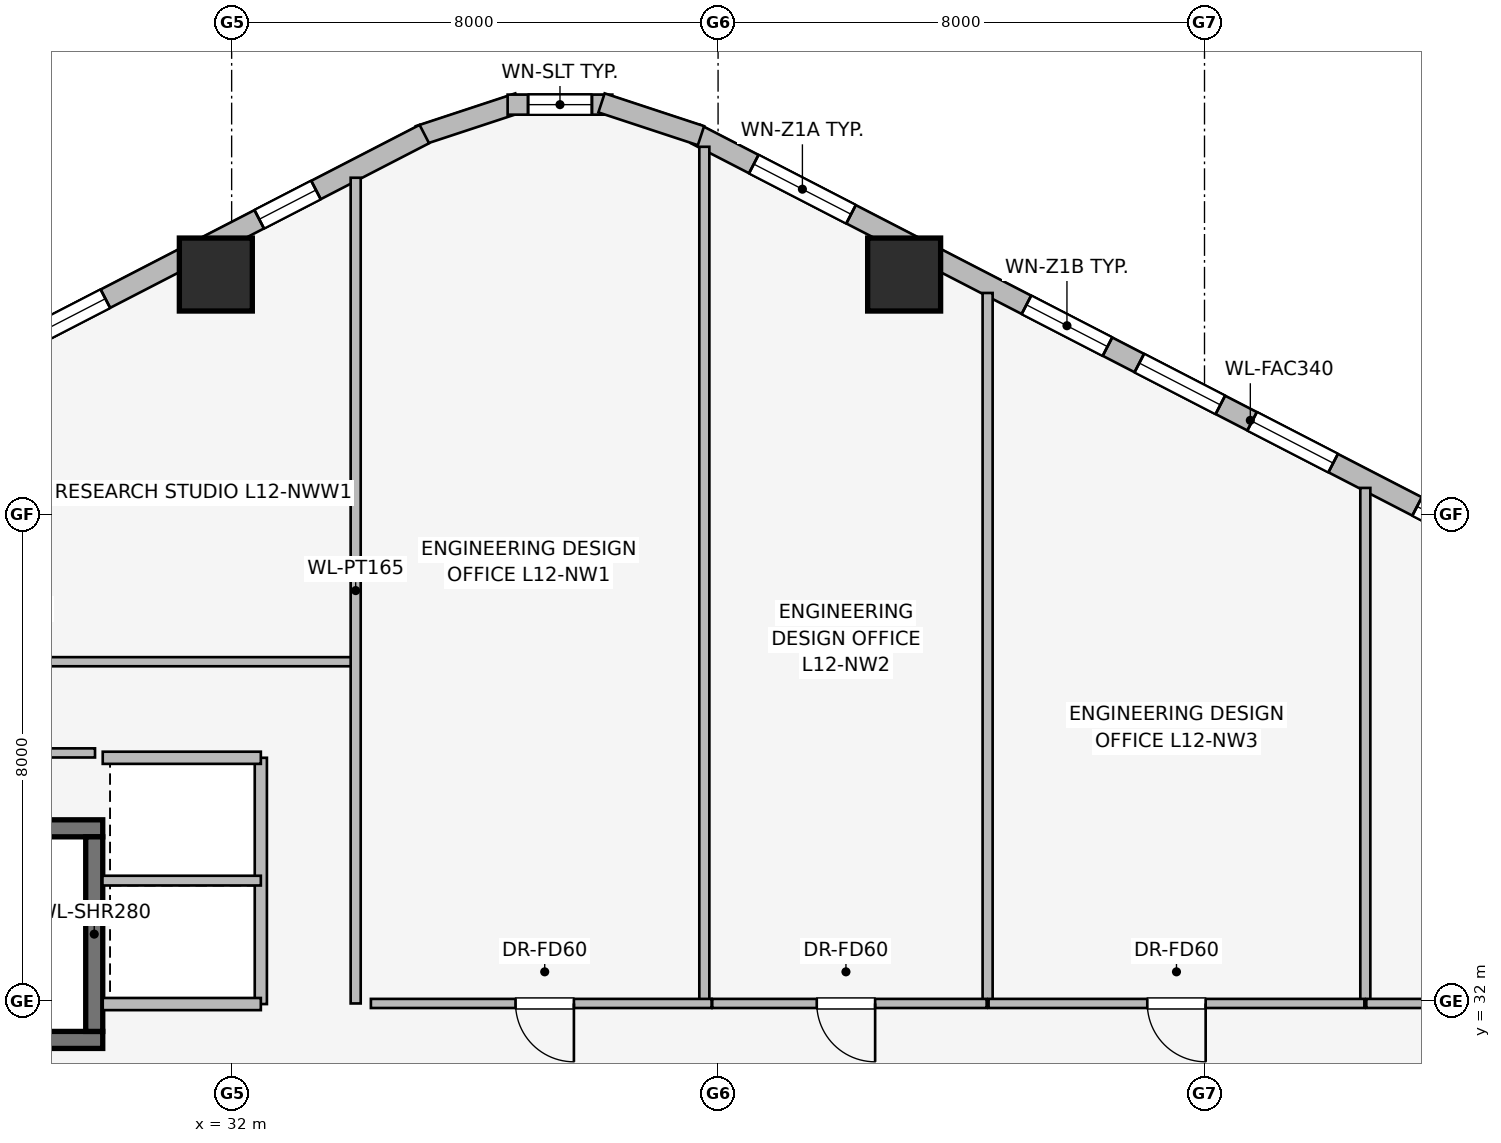
"""IFC4 building model, lengths in metres.
Left out: names, types, materials, properties, quantities, classifications, styles, units other than length and angle.
Written with IfcOpenShell. Run it as: python <this file> out.ifc"""

import sys

from ifc_helpers import new_model, si_unit, direction, frame, frame_2d, origin, origin_2d, place, context, subcontext, project, spatial, rectangle, extrude, element, fill, save


model = new_model("IFC4")
c1 = context("Model", 3, precision=1e-05, world=origin(), true_north=direction((0.0, 1.0)))
c2 = subcontext(c1, "Body", "Model", "MODEL_VIEW")
j1 = project(units=[si_unit("LENGTHUNIT", "METRE"), si_unit("PLANEANGLEUNIT", "RADIAN")], contexts=[c1])
p1 = place(None, origin())
s1 = spatial("IfcSite", under=j1, at=p1, CompositionType="ELEMENT")
p2 = place(p1, origin())
s2 = spatial("IfcBuilding", under=s1, at=p2, CompositionType="ELEMENT")
p3 = place(p2, frame((0.0, 0.0, 48.9)))
s3 = spatial("IfcBuildingStorey", under=s2, at=p3, CompositionType="ELEMENT", Elevation=48.9)
p4 = place(p3, frame((21.52, 31.36, 0.0), z_axis=(0.0, 0.0, 1.0), x_axis=(1.0, 0.0, 0.0)))
e1 = element("IfcWall", 1, at=p4, inside=s3, PredefinedType="SHEAR", context=c2, shape_type="SweptSolid", body=[
    extrude(rectangle(XDim=8.36, YDim=0.28, at=frame_2d((4.18, 0.0))), origin(), (0.0, 0.0, 1.0), 3.65),
])
p5 = place(p4, frame((0.45, 0.0, 0.0)))
e2 = element("IfcOpeningElement", 2, at=p5, cuts=e1, PredefinedType="OPENING", context=c2, shape_type="SweptSolid", body=[
    extrude(rectangle(XDim=1.05, YDim=2.0, at=frame_2d((0.525, 1.0))), frame((0.0, 0.15, 0.0), z_axis=(0.0, -1.0, 0.0), x_axis=(1.0, 0.0, 0.0)), (0.0, 0.0, 1.0), 0.3),
])
p6 = place(p3, frame((29.88, 34.84, 0.0), z_axis=(0.0, 0.0, 1.0), x_axis=(-1.0, 0.0, 0.0)))
e3 = element("IfcWall", 3, at=p6, inside=s3, PredefinedType="SHEAR", context=c2, shape_type="SweptSolid", body=[
    extrude(rectangle(XDim=8.36, YDim=0.28, at=frame_2d((4.18, 0.0))), origin(), (0.0, 0.0, 1.0), 3.65),
])
p7 = place(p3, frame((29.74, 31.5, 0.0), z_axis=(0.0, 0.0, 1.0), x_axis=(0.0, 1.0, 0.0)))
e4 = element("IfcWall", 4, at=p7, inside=s3, PredefinedType="SHEAR", context=c2, shape_type="SweptSolid", body=[
    extrude(rectangle(XDim=3.2, YDim=0.28, at=frame_2d((1.6, 0.0))), origin(), (0.0, 0.0, 1.0), 3.65),
])
for number, where, z_axis, x_axis in (
    (5, (43.06, 43.947, 0.0), (0.0, 0.0, 1.0), (1.0, 0.0, 0.0)),
    (6, (31.74, 43.947, 0.0), (0.0, 0.0, 1.0), (1.0, 0.0, 0.0)),
):
    element("IfcColumn", number, at=place(p3, frame(where, z_axis=z_axis, x_axis=x_axis)), inside=s3, PredefinedType="COLUMN", context=c2, shape_type="SweptSolid", body=[
        extrude(rectangle(XDim=1.2, YDim=1.2, at=origin_2d()), origin(), (0.0, 0.0, 1.0), 3.65),
    ])
p8 = place(p3, frame((39.631, 46.257, 0.0), z_axis=(0.0, 0.0, 1.0), x_axis=(0.888634413993, -0.458616264721, 0.0)))
e7 = element("IfcWall", 7, at=p8, inside=s3, PredefinedType="STANDARD", context=c2, shape_type="SweptSolid", body=[
    extrude(rectangle(XDim=20.531, YDim=0.34, at=frame_2d((10.266, 0.0))), origin(), (0.0, 0.0, 1.0), 2.654),
])
p9 = place(p8, frame((1.076, 0.0, 0.75)))
e8 = element("IfcOpeningElement", 8, at=p9, cuts=e7, PredefinedType="OPENING", context=c2, shape_type="SweptSolid", body=[
    extrude(rectangle(XDim=1.8, YDim=1.5, at=frame_2d((0.9, 0.75))), frame((0.0, 0.18, 0.0), z_axis=(0.0, -1.0, 0.0), x_axis=(1.0, 0.0, 0.0)), (0.0, 0.0, 1.0), 0.36),
])
p10 = place(p8, frame((6.122, 0.0, 0.75)))
e9 = element("IfcOpeningElement", 9, at=p10, cuts=e7, PredefinedType="OPENING", context=c2, shape_type="SweptSolid", body=[
    extrude(rectangle(XDim=1.5, YDim=1.5, at=frame_2d((0.75, 0.75))), frame((0.0, 0.18, 0.0), z_axis=(0.0, -1.0, 0.0), x_axis=(1.0, 0.0, 0.0)), (0.0, 0.0, 1.0), 0.36),
])
p11 = place(p8, frame((8.211, 0.0, 0.75)))
e10 = element("IfcOpeningElement", 10, at=p11, cuts=e7, PredefinedType="OPENING", context=c2, shape_type="SweptSolid", body=[
    extrude(rectangle(XDim=1.5, YDim=1.5, at=frame_2d((0.75, 0.75))), frame((0.0, 0.18, 0.0), z_axis=(0.0, -1.0, 0.0), x_axis=(1.0, 0.0, 0.0)), (0.0, 0.0, 1.0), 0.36),
])
p12 = place(p8, frame((10.299, 0.0, 0.75)))
e11 = element("IfcOpeningElement", 11, at=p12, cuts=e7, PredefinedType="OPENING", context=c2, shape_type="SweptSolid", body=[
    extrude(rectangle(XDim=1.5, YDim=1.5, at=frame_2d((0.75, 0.75))), frame((0.0, 0.18, 0.0), z_axis=(0.0, -1.0, 0.0), x_axis=(1.0, 0.0, 0.0)), (0.0, 0.0, 1.0), 0.36),
])
p13 = place(p8, frame((13.352, 0.0, 0.75)))
e12 = element("IfcOpeningElement", 12, at=p13, cuts=e7, PredefinedType="OPENING", context=c2, shape_type="SweptSolid", body=[
    extrude(rectangle(XDim=1.8, YDim=1.5, at=frame_2d((0.9, 0.75))), frame((0.0, 0.18, 0.0), z_axis=(0.0, -1.0, 0.0), x_axis=(1.0, 0.0, 0.0)), (0.0, 0.0, 1.0), 0.36),
])
p14 = place(p8, frame((18.272, 0.0, 0.75)))
e13 = element("IfcOpeningElement", 13, at=p14, cuts=e7, PredefinedType="OPENING", context=c2, shape_type="SweptSolid", body=[
    extrude(rectangle(XDim=1.5, YDim=1.5, at=frame_2d((0.75, 0.75))), frame((0.0, 0.18, 0.0), z_axis=(0.0, -1.0, 0.0), x_axis=(1.0, 0.0, 0.0)), (0.0, 0.0, 1.0), 0.36),
])
p15 = place(p3, frame((35.081, 46.231, 0.0), z_axis=(0.0, 0.0, 1.0), x_axis=(0.94976901097, 0.312951794691, 0.0)))
e14 = element("IfcWall", 14, at=p15, inside=s3, PredefinedType="STANDARD", context=c2, shape_type="SweptSolid", body=[
    extrude(rectangle(XDim=1.722, YDim=0.33, at=frame_2d((0.861, 0.0))), origin(), (0.0, 0.0, 1.0), 3.36),
])
p16 = place(p3, frame((36.539, 46.741, 0.0), z_axis=(0.0, 0.0, 1.0), x_axis=(1.0, 0.0, 0.0)))
e15 = element("IfcWall", 15, at=p16, inside=s3, PredefinedType="STANDARD", context=c2, shape_type="SweptSolid", body=[
    extrude(rectangle(XDim=1.722, YDim=0.33, at=frame_2d((0.861, 0.0))), origin(), (0.0, 0.0, 1.0), 3.36),
])
p17 = place(p16, frame((0.336, 0.0, 0.75)))
e16 = element("IfcOpeningElement", 16, at=p17, cuts=e15, PredefinedType="OPENING", context=c2, shape_type="SweptSolid", body=[
    extrude(rectangle(XDim=1.05, YDim=1.4, at=frame_2d((0.525, 0.7))), frame((0.0, 0.175, 0.0), z_axis=(0.0, -1.0, 0.0), x_axis=(1.0, 0.0, 0.0)), (0.0, 0.0, 1.0), 0.35),
])
p18 = place(p3, frame((38.083, 46.77, 0.0), z_axis=(0.0, 0.0, 1.0), x_axis=(0.94976901097, -0.312951794691, 0.0)))
e17 = element("IfcWall", 17, at=p18, inside=s3, PredefinedType="STANDARD", context=c2, shape_type="SweptSolid", body=[
    extrude(rectangle(XDim=1.722, YDim=0.33, at=frame_2d((0.861, 0.0))), origin(), (0.0, 0.0, 1.0), 3.36),
])
p19 = place(p3, frame((16.924, 36.841, 0.0), z_axis=(0.0, 0.0, 1.0), x_axis=(0.888634413993, 0.458616264721, 0.0)))
e18 = element("IfcWall", 18, at=p19, inside=s3, PredefinedType="STANDARD", context=c2, shape_type="SweptSolid", body=[
    extrude(rectangle(XDim=20.531, YDim=0.34, at=frame_2d((10.266, 0.0))), origin(), (0.0, 0.0, 1.0), 2.654),
])
p20 = place(p19, frame((2.161, 0.0, 0.75)))
e19 = element("IfcOpeningElement", 19, at=p20, cuts=e18, PredefinedType="OPENING", context=c2, shape_type="SweptSolid", body=[
    extrude(rectangle(XDim=1.05, YDim=1.4, at=frame_2d((0.525, 0.7))), frame((0.0, 0.18, 0.0), z_axis=(0.0, -1.0, 0.0), x_axis=(1.0, 0.0, 0.0)), (0.0, 0.0, 1.0), 0.36),
])
p21 = place(p19, frame((5.903, 0.0, 0.75)))
e20 = element("IfcOpeningElement", 20, at=p21, cuts=e18, PredefinedType="OPENING", context=c2, shape_type="SweptSolid", body=[
    extrude(rectangle(XDim=1.5, YDim=1.5, at=frame_2d((0.75, 0.75))), frame((0.0, 0.18, 0.0), z_axis=(0.0, -1.0, 0.0), x_axis=(1.0, 0.0, 0.0)), (0.0, 0.0, 1.0), 0.36),
])
p22 = place(p19, frame((9.516, 0.0, 0.75)))
e21 = element("IfcOpeningElement", 21, at=p22, cuts=e18, PredefinedType="OPENING", context=c2, shape_type="SweptSolid", body=[
    extrude(rectangle(XDim=1.5, YDim=1.5, at=frame_2d((0.75, 0.75))), frame((0.0, 0.18, 0.0), z_axis=(0.0, -1.0, 0.0), x_axis=(1.0, 0.0, 0.0)), (0.0, 0.0, 1.0), 0.36),
])
p23 = place(p19, frame((13.129, 0.0, 0.75)))
e22 = element("IfcOpeningElement", 22, at=p23, cuts=e18, PredefinedType="OPENING", context=c2, shape_type="SweptSolid", body=[
    extrude(rectangle(XDim=1.5, YDim=1.5, at=frame_2d((0.75, 0.75))), frame((0.0, 0.18, 0.0), z_axis=(0.0, -1.0, 0.0), x_axis=(1.0, 0.0, 0.0)), (0.0, 0.0, 1.0), 0.36),
])
p24 = place(p19, frame((17.476, 0.0, 0.75)))
e23 = element("IfcOpeningElement", 23, at=p24, cuts=e18, PredefinedType="OPENING", context=c2, shape_type="SweptSolid", body=[
    extrude(rectangle(XDim=1.05, YDim=1.4, at=frame_2d((0.525, 0.7))), frame((0.0, 0.18, 0.0), z_axis=(0.0, -1.0, 0.0), x_axis=(1.0, 0.0, 0.0)), (0.0, 0.0, 1.0), 0.36),
])
p25 = place(p3, frame((32.48, 31.95, 0.0), z_axis=(0.0, 0.0, 1.0), x_axis=(0.0, 1.0, 0.0)))
e24 = element("IfcWall", 24, at=p25, inside=s3, PredefinedType="PARTITIONING", context=c2, shape_type="SweptSolid", body=[
    extrude(rectangle(XDim=4.05, YDim=0.2, at=frame_2d((2.025, 0.0))), origin(), (0.0, 0.0, 1.0), 2.483),
])
for number, where, z_axis, x_axis in (
    (25, (29.88, 36.0, 0.0), (0.0, 0.0, 1.0), (1.0, 0.0, 0.0)),
    (26, (32.48, 31.95, 0.0), (0.0, 0.0, 1.0), (-1.0, 0.0, 0.0)),
):
    element("IfcWall", number, at=place(p3, frame(where, z_axis=z_axis, x_axis=x_axis)), inside=s3, PredefinedType="PARTITIONING", context=c2, shape_type="SweptSolid", body=[
        extrude(rectangle(XDim=2.6, YDim=0.2, at=frame_2d((1.3, 0.0))), origin(), (0.0, 0.0, 1.0), 3.36),
    ])
p26 = place(p3, frame((29.875, 33.98, 0.0), z_axis=(0.0, 0.0, 1.0), x_axis=(1.0, 0.0, 0.0)))
e27 = element("IfcWall", 27, at=p26, inside=s3, PredefinedType="PARTITIONING", context=c2, shape_type="SweptSolid", body=[
    extrude(rectangle(XDim=2.605, YDim=0.16, at=frame_2d((1.302, 0.0))), origin(), (0.0, 0.0, 1.0), 3.36),
])
p27 = place(p3, frame((34.0, 37.58, 0.0), z_axis=(0.0, 0.0, 1.0), x_axis=(-1.0, 0.0, 0.0)))
e28 = element("IfcWall", 28, at=p27, inside=s3, PredefinedType="PARTITIONING", context=c2, shape_type="SweptSolid", body=[
    extrude(rectangle(XDim=15.6, YDim=0.15, at=frame_2d((7.8, 0.0))), origin(), (0.0, 0.0, 1.0), 3.36),
])
p28 = place(p27, frame((5.195, 0.0, 0.0)))
e29 = element("IfcOpeningElement", 29, at=p28, cuts=e28, PredefinedType="OPENING", context=c2, shape_type="SweptSolid", body=[
    extrude(rectangle(XDim=0.96, YDim=2.0, at=frame_2d((0.48, 1.0))), frame((0.0, 0.085, 0.0), z_axis=(0.0, -1.0, 0.0), x_axis=(1.0, 0.0, 0.0)), (0.0, 0.0, 1.0), 0.17),
])
p29 = place(p3, frame((34.04, 31.96, 0.0), z_axis=(0.0, 0.0, 1.0), x_axis=(0.0, 1.0, 0.0)))
e30 = element("IfcWall", 30, at=p29, inside=s3, PredefinedType="PARTITIONING", context=c2, shape_type="SweptSolid", body=[
    extrude(rectangle(XDim=13.579, YDim=0.165, at=frame_2d((6.79, 0.0))), origin(), (0.0, 0.0, 1.0), 3.36),
])
p30 = place(p3, frame((39.774, 31.97, 0.0), z_axis=(0.0, 0.0, 1.0), x_axis=(0.0, 1.0, 0.0)))
e31 = element("IfcWall", 31, at=p30, inside=s3, PredefinedType="PARTITIONING", context=c2, shape_type="SweptSolid", body=[
    extrude(rectangle(XDim=14.078, YDim=0.165, at=frame_2d((7.039, 0.0))), origin(), (0.0, 0.0, 1.0), 2.483),
])
p31 = place(p3, frame((44.433, 31.97, 0.0), z_axis=(0.0, 0.0, 1.0), x_axis=(0.0, 1.0, 0.0)))
e32 = element("IfcWall", 32, at=p31, inside=s3, PredefinedType="PARTITIONING", context=c2, shape_type="SweptSolid", body=[
    extrude(rectangle(XDim=11.674, YDim=0.165, at=frame_2d((5.837, 0.0))), origin(), (0.0, 0.0, 1.0), 3.36),
])
p32 = place(p3, frame((50.645, 31.97, 0.0), z_axis=(0.0, 0.0, 1.0), x_axis=(0.0, 1.0, 0.0)))
e33 = element("IfcWall", 33, at=p32, inside=s3, PredefinedType="PARTITIONING", context=c2, shape_type="SweptSolid", body=[
    extrude(rectangle(XDim=8.468, YDim=0.165, at=frame_2d((4.234, 0.0))), origin(), (0.0, 0.0, 1.0), 3.36),
])
p33 = place(p3, frame((39.894, 31.96, 0.0), z_axis=(0.0, 0.0, 1.0), x_axis=(-1.0, 0.0, 0.0)))
e34 = element("IfcWall", 34, at=p33, inside=s3, PredefinedType="PARTITIONING", context=c2, shape_type="SweptSolid", body=[
    extrude(rectangle(XDim=5.604, YDim=0.15, at=frame_2d((2.802, 0.0))), origin(), (0.0, 0.0, 1.0), 3.36),
])
p34 = place(p33, frame((2.265, 0.0, 0.0)))
e35 = element("IfcOpeningElement", 35, at=p34, cuts=e34, PredefinedType="OPENING", context=c2, shape_type="SweptSolid", body=[
    extrude(rectangle(XDim=0.96, YDim=2.0, at=frame_2d((0.48, 1.0))), frame((0.0, 0.085, 0.0), z_axis=(0.0, -1.0, 0.0), x_axis=(1.0, 0.0, 0.0)), (0.0, 0.0, 1.0), 0.17),
])
p35 = place(p3, frame((44.417, 31.96, 0.0), z_axis=(0.0, 0.0, 1.0), x_axis=(-1.0, 0.0, 0.0)))
e36 = element("IfcWall", 36, at=p35, inside=s3, PredefinedType="PARTITIONING", context=c2, shape_type="SweptSolid", body=[
    extrude(rectangle(XDim=4.513, YDim=0.15, at=frame_2d((2.256, 0.0))), origin(), (0.0, 0.0, 1.0), 3.36),
])
p36 = place(p35, frame((1.834, 0.0, 0.0)))
e37 = element("IfcOpeningElement", 37, at=p36, cuts=e36, PredefinedType="OPENING", context=c2, shape_type="SweptSolid", body=[
    extrude(rectangle(XDim=0.96, YDim=2.0, at=frame_2d((0.48, 1.0))), frame((0.0, 0.085, 0.0), z_axis=(0.0, -1.0, 0.0), x_axis=(1.0, 0.0, 0.0)), (0.0, 0.0, 1.0), 0.17),
])
p37 = place(p3, frame((50.629, 31.96, 0.0), z_axis=(0.0, 0.0, 1.0), x_axis=(-1.0, 0.0, 0.0)))
e38 = element("IfcWall", 38, at=p37, inside=s3, PredefinedType="PARTITIONING", context=c2, shape_type="SweptSolid", body=[
    extrude(rectangle(XDim=6.18, YDim=0.15, at=frame_2d((3.09, 0.0))), origin(), (0.0, 0.0, 1.0), 3.36),
])
p38 = place(p37, frame((2.61, 0.0, 0.0)))
e39 = element("IfcOpeningElement", 39, at=p38, cuts=e38, PredefinedType="OPENING", context=c2, shape_type="SweptSolid", body=[
    extrude(rectangle(XDim=0.96, YDim=2.0, at=frame_2d((0.48, 1.0))), frame((0.0, 0.085, 0.0), z_axis=(0.0, -1.0, 0.0), x_axis=(1.0, 0.0, 0.0)), (0.0, 0.0, 1.0), 0.17),
])
p39 = place(p3, frame((55.174, 31.96, 0.0), z_axis=(0.0, 0.0, 1.0), x_axis=(-1.0, 0.0, 0.0)))
e40 = element("IfcWall", 40, at=p39, inside=s3, PredefinedType="PARTITIONING", context=c2, shape_type="SweptSolid", body=[
    extrude(rectangle(XDim=4.513, YDim=0.15, at=frame_2d((2.257, 0.0))), origin(), (0.0, 0.0, 1.0), 3.36),
])
p40 = place(p39, frame((1.72, 0.0, 0.0)))
e41 = element("IfcOpeningElement", 41, at=p40, cuts=e40, PredefinedType="OPENING", context=c2, shape_type="SweptSolid", body=[
    extrude(rectangle(XDim=0.96, YDim=2.0, at=frame_2d((0.48, 1.0))), frame((0.0, 0.085, 0.0), z_axis=(0.0, -1.0, 0.0), x_axis=(1.0, 0.0, 0.0)), (0.0, 0.0, 1.0), 0.17),
])
p41 = place(p3, frame((29.753, 36.08, 0.0), z_axis=(0.0, 0.0, 1.0), x_axis=(-1.0, 0.0, 0.0)))
e42 = element("IfcWall", 42, at=p41, inside=s3, PredefinedType="PARTITIONING", context=c2, shape_type="SweptSolid", body=[
    extrude(rectangle(XDim=7.353, YDim=0.15, at=frame_2d((3.677, 0.0))), origin(), (0.0, 0.0, 1.0), 3.36),
])
p42 = place(p9, origin())
e43 = element("IfcWindow", 43, at=p42, inside=s3, PartitioningType="SINGLE_PANEL", PredefinedType="WINDOW", context=c2, shape_type="SweptSolid", body=[
    extrude(rectangle(XDim=1.8, YDim=1.5, at=frame_2d((0.9, 0.75))), frame((0.0, 0.03, 0.0), z_axis=(0.0, -1.0, 0.0), x_axis=(1.0, 0.0, 0.0)), (0.0, 0.0, 1.0), 0.06),
])
fill(e8, e43)
p43 = place(p10, origin())
e44 = element("IfcWindow", 44, at=p43, inside=s3, PartitioningType="SINGLE_PANEL", PredefinedType="WINDOW", context=c2, shape_type="SweptSolid", body=[
    extrude(rectangle(XDim=1.5, YDim=1.5, at=frame_2d((0.75, 0.75))), frame((0.0, 0.03, 0.0), z_axis=(0.0, -1.0, 0.0), x_axis=(1.0, 0.0, 0.0)), (0.0, 0.0, 1.0), 0.06),
])
fill(e9, e44)
p44 = place(p11, origin())
e45 = element("IfcWindow", 45, at=p44, inside=s3, PartitioningType="SINGLE_PANEL", PredefinedType="WINDOW", context=c2, shape_type="SweptSolid", body=[
    extrude(rectangle(XDim=1.5, YDim=1.5, at=frame_2d((0.75, 0.75))), frame((0.0, 0.03, 0.0), z_axis=(0.0, -1.0, 0.0), x_axis=(1.0, 0.0, 0.0)), (0.0, 0.0, 1.0), 0.06),
])
fill(e10, e45)
p45 = place(p12, origin())
e46 = element("IfcWindow", 46, at=p45, inside=s3, PartitioningType="SINGLE_PANEL", PredefinedType="WINDOW", context=c2, shape_type="SweptSolid", body=[
    extrude(rectangle(XDim=1.5, YDim=1.5, at=frame_2d((0.75, 0.75))), frame((0.0, 0.03, 0.0), z_axis=(0.0, -1.0, 0.0), x_axis=(1.0, 0.0, 0.0)), (0.0, 0.0, 1.0), 0.06),
])
fill(e11, e46)
p46 = place(p13, origin())
e47 = element("IfcWindow", 47, at=p46, inside=s3, PartitioningType="SINGLE_PANEL", PredefinedType="WINDOW", context=c2, shape_type="SweptSolid", body=[
    extrude(rectangle(XDim=1.8, YDim=1.5, at=frame_2d((0.9, 0.75))), frame((0.0, 0.03, 0.0), z_axis=(0.0, -1.0, 0.0), x_axis=(1.0, 0.0, 0.0)), (0.0, 0.0, 1.0), 0.06),
])
fill(e12, e47)
p47 = place(p17, origin())
e48 = element("IfcWindow", 48, at=p47, inside=s3, PartitioningType="SINGLE_PANEL", PredefinedType="WINDOW", context=c2, shape_type="SweptSolid", body=[
    extrude(rectangle(XDim=1.05, YDim=1.4, at=frame_2d((0.525, 0.7))), frame((0.0, 0.03, 0.0), z_axis=(0.0, -1.0, 0.0), x_axis=(1.0, 0.0, 0.0)), (0.0, 0.0, 1.0), 0.06),
])
fill(e16, e48)
p48 = place(p23, origin())
e49 = element("IfcWindow", 49, at=p48, inside=s3, PartitioningType="SINGLE_PANEL", PredefinedType="WINDOW", context=c2, shape_type="SweptSolid", body=[
    extrude(rectangle(XDim=1.5, YDim=1.5, at=frame_2d((0.75, 0.75))), frame((0.0, 0.03, 0.0), z_axis=(0.0, -1.0, 0.0), x_axis=(1.0, 0.0, 0.0)), (0.0, 0.0, 1.0), 0.06),
])
fill(e22, e49)
p49 = place(p24, origin())
e50 = element("IfcWindow", 50, at=p49, inside=s3, PartitioningType="SINGLE_PANEL", PredefinedType="WINDOW", context=c2, shape_type="SweptSolid", body=[
    extrude(rectangle(XDim=1.05, YDim=1.4, at=frame_2d((0.525, 0.7))), frame((0.0, 0.03, 0.0), z_axis=(0.0, -1.0, 0.0), x_axis=(1.0, 0.0, 0.0)), (0.0, 0.0, 1.0), 0.06),
])
fill(e23, e50)
p50 = place(p34, origin())
e51 = element("IfcDoor", 51, at=p50, inside=s3, OperationType="SINGLE_SWING_LEFT", PredefinedType="DOOR", context=c2, shape_type="SweptSolid", body=[
    extrude(rectangle(XDim=0.96, YDim=2.0, at=frame_2d((0.48, 1.0))), frame((0.0, 0.025, 0.0), z_axis=(0.0, -1.0, 0.0), x_axis=(1.0, 0.0, 0.0)), (0.0, 0.0, 1.0), 0.05),
])
fill(e35, e51)
p51 = place(p36, origin())
e52 = element("IfcDoor", 52, at=p51, inside=s3, OperationType="SINGLE_SWING_LEFT", PredefinedType="DOOR", context=c2, shape_type="SweptSolid", body=[
    extrude(rectangle(XDim=0.96, YDim=2.0, at=frame_2d((0.48, 1.0))), frame((0.0, 0.025, 0.0), z_axis=(0.0, -1.0, 0.0), x_axis=(1.0, 0.0, 0.0)), (0.0, 0.0, 1.0), 0.05),
])
fill(e37, e52)
p52 = place(p38, origin())
e53 = element("IfcDoor", 53, at=p52, inside=s3, OperationType="SINGLE_SWING_LEFT", PredefinedType="DOOR", context=c2, shape_type="SweptSolid", body=[
    extrude(rectangle(XDim=0.96, YDim=2.0, at=frame_2d((0.48, 1.0))), frame((0.0, 0.025, 0.0), z_axis=(0.0, -1.0, 0.0), x_axis=(1.0, 0.0, 0.0)), (0.0, 0.0, 1.0), 0.05),
])
fill(e39, e53)
save(model, sys.argv[1])
